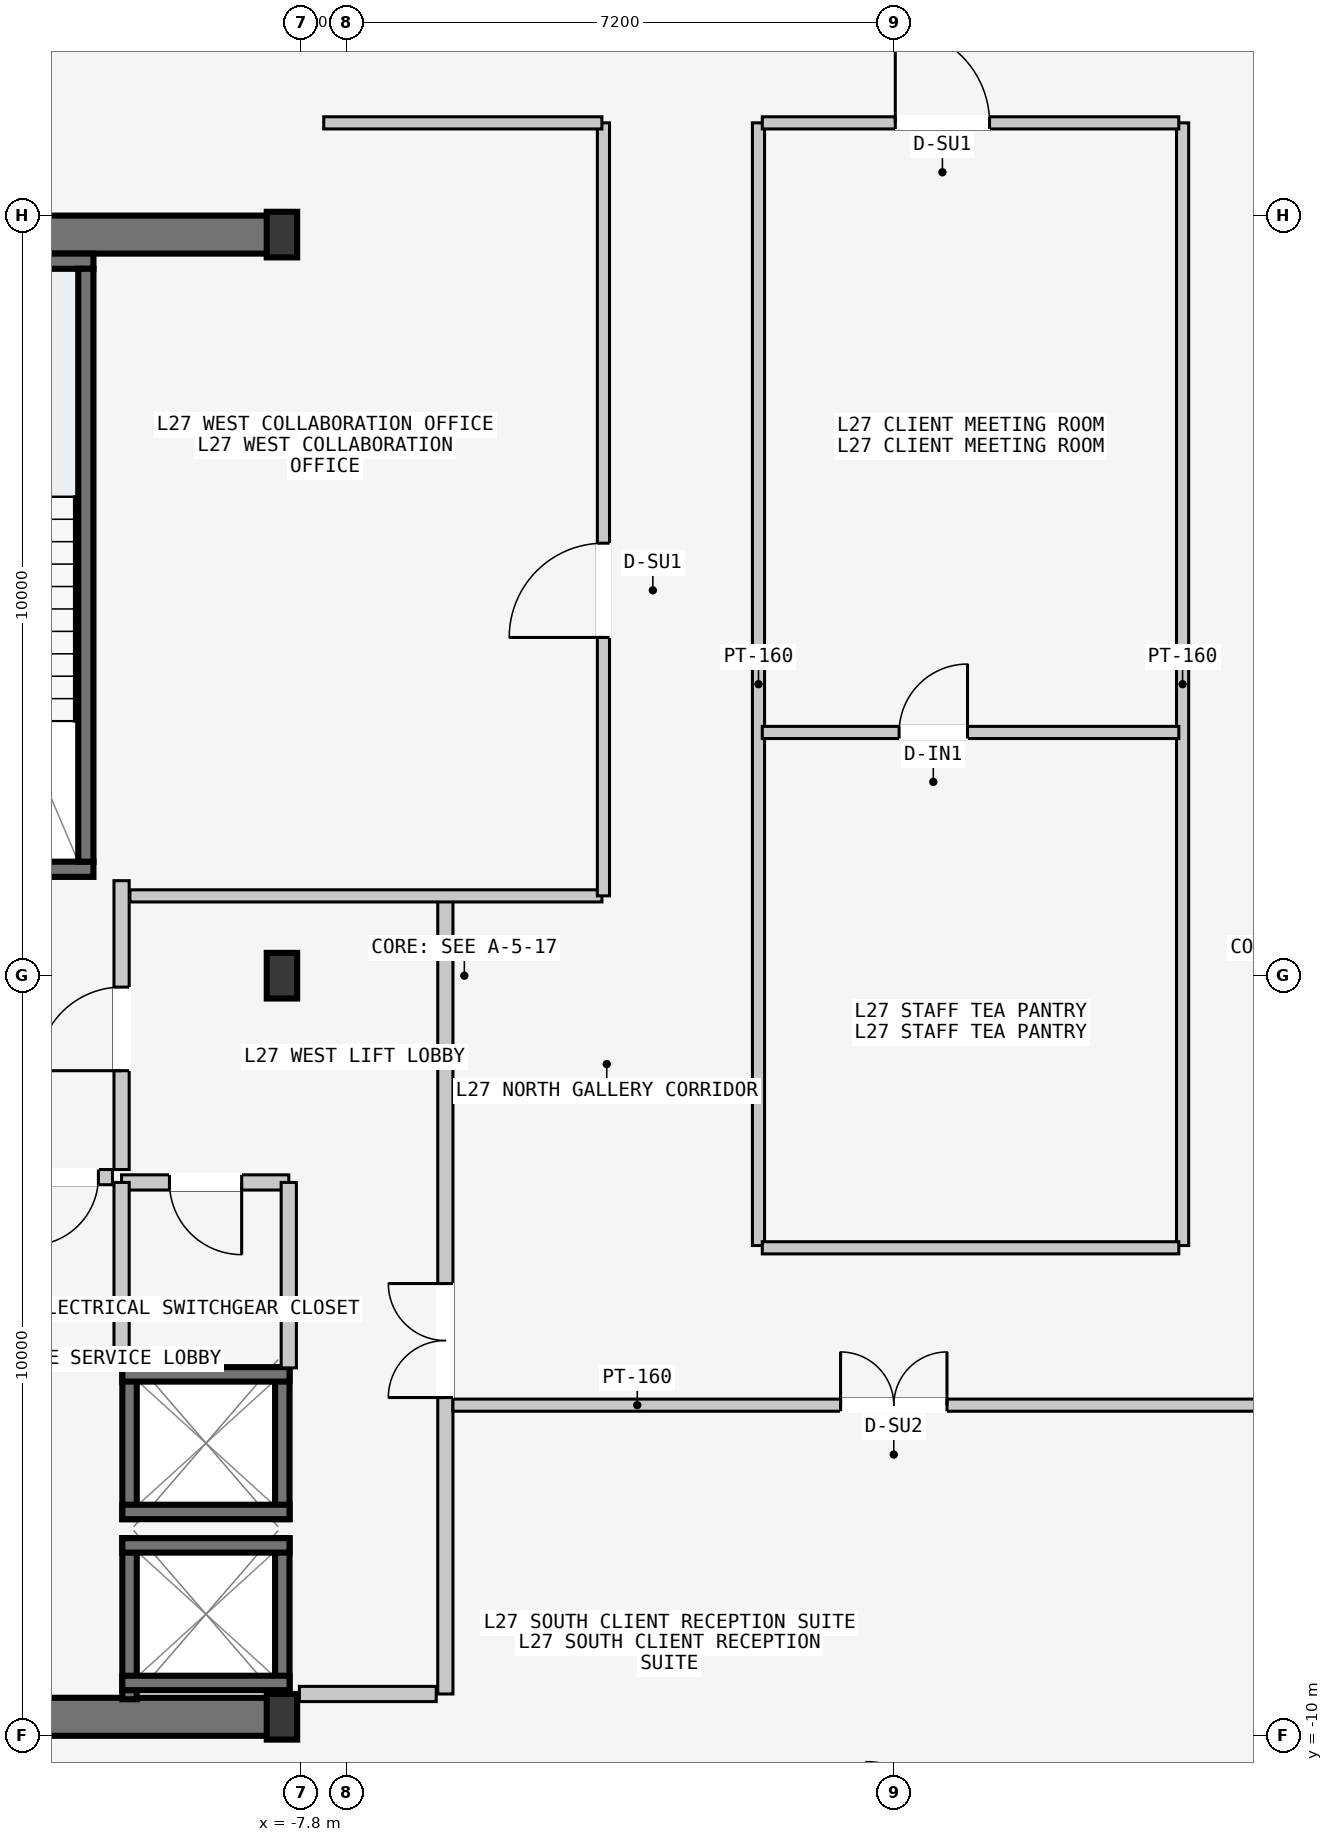
"""IFC4 building model, lengths in metres.
Left out: names, types, materials, properties, quantities, classifications, styles, units other than length and angle.
Written with IfcOpenShell. Run it as: python <this file> out.ifc"""

import sys

from ifc_helpers import new_model, si_unit, direction, frame, frame_2d, origin, origin_2d, place, context, subcontext, project, spatial, rectangle, i_section, extrude, element, fill, save


model = new_model("IFC4")
c1 = context("Model", 3, precision=1e-05, world=origin(), true_north=direction((0.0, 1.0)))
c2 = subcontext(c1, "Body", "Model", "MODEL_VIEW")
j1 = project(units=[si_unit("LENGTHUNIT", "METRE"), si_unit("PLANEANGLEUNIT", "RADIAN")], contexts=[c1])
p1 = place(None, origin())
s1 = spatial("IfcSite", under=j1, at=p1, CompositionType="ELEMENT")
p2 = place(p1, origin())
s2 = spatial("IfcBuilding", under=s1, at=p2, CompositionType="ELEMENT")
p3 = place(p2, frame((0.0, 0.0, 106.2)))
s3 = spatial("IfcBuildingStorey", under=s2, at=p3, CompositionType="ELEMENT", Elevation=106.2)
for number, where, z_axis, x_axis in (
    (1, (-14.53, -9.75, -0.2), (0.0, 0.0, 1.0), (1.0, 0.0, 0.0)),
    (2, (-14.53, 9.75, -0.2), (0.0, 0.0, 1.0), (1.0, 0.0, 0.0)),
):
    element("IfcWall", number, at=place(p3, frame(where, z_axis=z_axis, x_axis=x_axis)), inside=s3, PredefinedType="SHEAR", context=c2, shape_type="SweptSolid", body=[
        extrude(rectangle(XDim=6.46, YDim=0.5, at=frame_2d((3.23, 0.0))), origin(), (0.0, 0.0, 1.0), 3.6),
    ])
p4 = place(p3, frame((-14.25, 1.4, -0.2), z_axis=(0.0, 0.0, 1.0), x_axis=(1.0, 0.0, 0.0)))
e3 = element("IfcWall", 3, at=p4, inside=s3, PredefinedType="SOLIDWALL", context=c2, shape_type="SweptSolid", body=[
    extrude(rectangle(XDim=3.72, YDim=0.2, at=frame_2d((1.86, 0.0))), origin(), (0.0, 0.0, 1.0), 3.6),
])
p5 = place(p4, frame((1.5, 0.0, 0.2)))
e4 = element("IfcOpeningElement", 4, at=p5, cuts=e3, PredefinedType="OPENING", context=c2, shape_type="SweptSolid", body=[
    extrude(rectangle(XDim=1.12, YDim=2.18, at=frame_2d((0.56, 1.09))), frame((0.0, 0.11, 0.0), z_axis=(0.0, -1.0, 0.0), x_axis=(1.0, 0.0, 0.0)), (0.0, 0.0, 1.0), 0.22),
])
p6 = place(p3, frame((-14.25, 9.4, -0.2), z_axis=(0.0, 0.0, 1.0), x_axis=(1.0, 0.0, 0.0)))
e5 = element("IfcWall", 5, at=p6, inside=s3, PredefinedType="SOLIDWALL", context=c2, shape_type="SweptSolid", body=[
    extrude(rectangle(XDim=3.72, YDim=0.2, at=frame_2d((1.86, 0.0))), origin(), (0.0, 0.0, 1.0), 3.6),
])
p7 = place(p3, frame((-10.63, 1.5, -0.2), z_axis=(0.0, 0.0, 1.0), x_axis=(0.0, 1.0, 0.0)))
e6 = element("IfcWall", 6, at=p7, inside=s3, PredefinedType="SOLIDWALL", context=c2, shape_type="SweptSolid", body=[
    extrude(rectangle(XDim=7.8, YDim=0.2, at=frame_2d((3.9, 0.0))), origin(), (0.0, 0.0, 1.0), 3.6),
])
for number, where, z_axis, x_axis in (
    (7, (-8.05, -9.75, 0.0), (0.0, 0.0, 1.0), (1.0, 0.0, 0.0)),
    (8, (-8.05, 0.0, 0.0), (0.0, 0.0, 1.0), (1.0, 0.0, 0.0)),
    (9, (-8.05, 9.75, 0.0), (0.0, 0.0, 1.0), (1.0, 0.0, 0.0)),
):
    element("IfcColumn", number, at=place(p3, frame(where, z_axis=z_axis, x_axis=x_axis)), inside=s3, PredefinedType="COLUMN", context=c2, shape_type="SweptSolid", body=[
        extrude(i_section(OverallWidth=0.4, OverallDepth=0.6, WebThickness=0.022, FlangeThickness=0.036, at=origin_2d()), origin(), (0.0, 0.0, 1.0), 3.6),
    ])
for number, where, z_axis, x_axis in (
    (10, (-8.045, -9.52, -0.2), (0.0, 0.0, 1.0), (0.0, 1.0, 0.0)),
    (11, (-10.055, -9.52, -0.2), (0.0, 0.0, 1.0), (0.0, 1.0, 0.0)),
):
    element("IfcWall", number, at=place(p3, frame(where, z_axis=z_axis, x_axis=x_axis)), inside=s3, PredefinedType="SOLIDWALL", context=c2, shape_type="SweptSolid", body=[
        extrude(rectangle(XDim=2.12, YDim=0.19, at=frame_2d((1.06, 0.0))), origin(), (0.0, 0.0, 1.0), 3.6),
    ])
for number, where, z_axis, x_axis in (
    (12, (-10.15, -7.495, -0.2), (0.0, 0.0, 1.0), (1.0, 0.0, 0.0)),
    (13, (-10.15, -9.305, -0.2), (0.0, 0.0, 1.0), (1.0, 0.0, 0.0)),
):
    element("IfcWall", number, at=place(p3, frame(where, z_axis=z_axis, x_axis=x_axis)), inside=s3, PredefinedType="SOLIDWALL", context=c2, shape_type="SweptSolid", body=[
        extrude(rectangle(XDim=2.2, YDim=0.19, at=frame_2d((1.1, 0.0))), origin(), (0.0, 0.0, 1.0), 3.6),
    ])
for number, where, z_axis, x_axis in (
    (14, (-8.045, -7.15, -0.2), (0.0, 0.0, 1.0), (0.0, 1.0, 0.0)),
    (15, (-10.055, -7.15, -0.2), (0.0, 0.0, 1.0), (0.0, 1.0, 0.0)),
):
    element("IfcWall", number, at=place(p3, frame(where, z_axis=z_axis, x_axis=x_axis)), inside=s3, PredefinedType="SOLIDWALL", context=c2, shape_type="SweptSolid", body=[
        extrude(rectangle(XDim=2.0, YDim=0.19, at=frame_2d((1.0, 0.0))), origin(), (0.0, 0.0, 1.0), 3.6),
    ])
for number, where, z_axis, x_axis in (
    (16, (-10.15, -5.245, -0.2), (0.0, 0.0, 1.0), (1.0, 0.0, 0.0)),
    (17, (-10.15, -7.055, -0.2), (0.0, 0.0, 1.0), (1.0, 0.0, 0.0)),
):
    element("IfcWall", number, at=place(p3, frame(where, z_axis=z_axis, x_axis=x_axis)), inside=s3, PredefinedType="SOLIDWALL", context=c2, shape_type="SweptSolid", body=[
        extrude(rectangle(XDim=2.2, YDim=0.19, at=frame_2d((1.1, 0.0))), origin(), (0.0, 0.0, 1.0), 3.6),
    ])
p8 = place(p3, frame((-5.9, -9.45, 0.0), z_axis=(0.0, 0.0, 1.0), x_axis=(0.0, 1.0, 0.0)))
e18 = element("IfcWall", 18, at=p8, inside=s3, PredefinedType="PARTITIONING", context=c2, shape_type="SweptSolid", body=[
    extrude(rectangle(XDim=10.5, YDim=0.2, at=frame_2d((5.25, 0.0))), origin(), (0.0, 0.0, 1.0), 3.4),
])
p9 = place(p8, frame((3.9, 0.0, 0.0)))
e19 = element("IfcOpeningElement", 19, at=p9, cuts=e18, PredefinedType="OPENING", context=c2, shape_type="SweptSolid", body=[
    extrude(rectangle(XDim=1.5, YDim=2.2, at=frame_2d((0.75, 1.1))), frame((0.0, 0.11, 0.0), z_axis=(0.0, -1.0, 0.0), x_axis=(1.0, 0.0, 0.0)), (0.0, 0.0, 1.0), 0.22),
])
p10 = place(p3, frame((-6.02, -9.45, 0.0), z_axis=(0.0, 0.0, 1.0), x_axis=(-1.0, 0.0, 0.0)))
e20 = element("IfcWall", 20, at=p10, inside=s3, PredefinedType="PARTITIONING", context=c2, shape_type="SweptSolid", body=[
    extrude(rectangle(XDim=1.8, YDim=0.2, at=frame_2d((0.9, 0.0))), origin(), (0.0, 0.0, 1.0), 3.4),
])
p11 = place(p3, frame((-10.16, -2.55, 0.0), z_axis=(0.0, 0.0, 1.0), x_axis=(0.0, 1.0, 0.0)))
e21 = element("IfcWall", 21, at=p11, inside=s3, PredefinedType="PARTITIONING", context=c2, shape_type="SweptSolid", body=[
    extrude(rectangle(XDim=3.8, YDim=0.2, at=frame_2d((1.9, 0.0))), origin(), (0.0, 0.0, 1.0), 3.4),
])
p12 = place(p11, frame((1.3, 0.0, 0.0)))
e22 = element("IfcOpeningElement", 22, at=p12, cuts=e21, PredefinedType="OPENING", context=c2, shape_type="SweptSolid", body=[
    extrude(rectangle(XDim=1.1, YDim=2.15, at=frame_2d((0.55, 1.075))), frame((0.0, 0.11, 0.0), z_axis=(0.0, -1.0, 0.0), x_axis=(1.0, 0.0, 0.0)), (0.0, 0.0, 1.0), 0.22),
])
p13 = place(p3, frame((-10.28, -2.65, 0.0), z_axis=(0.0, 0.0, 1.0), x_axis=(-1.0, 0.0, 0.0)))
e23 = element("IfcWall", 23, at=p13, inside=s3, PredefinedType="PARTITIONING", context=c2, shape_type="SweptSolid", body=[
    extrude(rectangle(XDim=1.27, YDim=0.2, at=frame_2d((0.635, 0.0))), origin(), (0.0, 0.0, 1.0), 3.4),
])
p14 = place(p13, frame((0.185, 0.0, 0.0)))
e24 = element("IfcOpeningElement", 24, at=p14, cuts=e23, PredefinedType="OPENING", context=c2, shape_type="SweptSolid", body=[
    extrude(rectangle(XDim=0.9, YDim=2.15, at=frame_2d((0.45, 1.075))), frame((0.0, 0.11, 0.0), z_axis=(0.0, -1.0, 0.0), x_axis=(1.0, 0.0, 0.0)), (0.0, 0.0, 1.0), 0.22),
])
p15 = place(p3, frame((-7.96, -2.72, 0.0), z_axis=(0.0, 0.0, 1.0), x_axis=(-1.0, 0.0, 0.0)))
e25 = element("IfcWall", 25, at=p15, inside=s3, PredefinedType="PARTITIONING", context=c2, shape_type="SweptSolid", body=[
    extrude(rectangle(XDim=2.2, YDim=0.2, at=frame_2d((1.1, 0.0))), origin(), (0.0, 0.0, 1.0), 3.4),
])
p16 = place(p15, frame((0.62, 0.0, 0.0)))
e26 = element("IfcOpeningElement", 26, at=p16, cuts=e25, PredefinedType="OPENING", context=c2, shape_type="SweptSolid", body=[
    extrude(rectangle(XDim=0.95, YDim=2.1, at=frame_2d((0.475, 1.05))), frame((0.0, 0.11, 0.0), z_axis=(0.0, -1.0, 0.0), x_axis=(1.0, 0.0, 0.0)), (0.0, 0.0, 1.0), 0.22),
])
for number, where, z_axis, x_axis in (
    (27, (-7.96, -5.16, 0.0), (0.0, 0.0, 1.0), (0.0, 1.0, 0.0)),
    (28, (-10.16, -5.16, 0.0), (0.0, 0.0, 1.0), (0.0, 1.0, 0.0)),
):
    element("IfcWall", number, at=place(p3, frame(where, z_axis=z_axis, x_axis=x_axis)), inside=s3, PredefinedType="PARTITIONING", context=c2, shape_type="SweptSolid", body=[
        extrude(rectangle(XDim=2.44, YDim=0.2, at=frame_2d((1.22, 0.0))), origin(), (0.0, 0.0, 1.0), 3.4),
    ])
p17 = place(p3, frame((-10.05, 1.05, 0.0), z_axis=(0.0, 0.0, 1.0), x_axis=(1.0, 0.0, 0.0)))
e29 = element("IfcWall", 29, at=p17, inside=s3, PredefinedType="PARTITIONING", context=c2, shape_type="SweptSolid", body=[
    extrude(rectangle(XDim=6.21, YDim=0.16, at=frame_2d((3.105, 0.0))), origin(), (0.0, 0.0, 1.0), 3.4),
])
p18 = place(p3, frame((-3.82, 1.05, 0.0), z_axis=(0.0, 0.0, 1.0), x_axis=(0.0, 1.0, 0.0)))
e30 = element("IfcWall", 30, at=p18, inside=s3, PredefinedType="PARTITIONING", context=c2, shape_type="SweptSolid", body=[
    extrude(rectangle(XDim=10.17, YDim=0.16, at=frame_2d((5.085, 0.0))), origin(), (0.0, 0.0, 1.0), 3.4),
])
p19 = place(p18, frame((3.4, 0.0, 0.0)))
e31 = element("IfcOpeningElement", 31, at=p19, cuts=e30, PredefinedType="OPENING", context=c2, shape_type="SweptSolid", body=[
    extrude(rectangle(XDim=1.24, YDim=2.24, at=frame_2d((0.62, 1.12))), frame((0.0, 0.09, 0.0), z_axis=(0.0, -1.0, 0.0), x_axis=(1.0, 0.0, 0.0)), (0.0, 0.0, 1.0), 0.18),
])
p20 = place(p3, frame((-7.5, 11.22, 0.0), z_axis=(0.0, 0.0, 1.0), x_axis=(1.0, 0.0, 0.0)))
e32 = element("IfcWall", 32, at=p20, inside=s3, PredefinedType="PARTITIONING", context=c2, shape_type="SweptSolid", body=[
    extrude(rectangle(XDim=3.66, YDim=0.16, at=frame_2d((1.83, 0.0))), origin(), (0.0, 0.0, 1.0), 3.4),
])
for number, where, z_axis, x_axis in (
    (33, (-1.78, -3.55, 0.0), (0.0, 0.0, 1.0), (0.0, 1.0, 0.0)),
    (34, (3.8, -3.55, 0.0), (0.0, 0.0, 1.0), (0.0, 1.0, 0.0)),
):
    element("IfcWall", number, at=place(p3, frame(where, z_axis=z_axis, x_axis=x_axis)), inside=s3, PredefinedType="PARTITIONING", context=c2, shape_type="SweptSolid", body=[
        extrude(rectangle(XDim=14.77, YDim=0.16, at=frame_2d((7.385, 0.0))), origin(), (0.0, 0.0, 1.0), 3.4),
    ])
p21 = place(p3, frame((-1.73, -3.58, 0.0), z_axis=(0.0, 0.0, 1.0), x_axis=(1.0, 0.0, 0.0)))
e35 = element("IfcWall", 35, at=p21, inside=s3, PredefinedType="PARTITIONING", context=c2, shape_type="SweptSolid", body=[
    extrude(rectangle(XDim=5.48, YDim=0.16, at=frame_2d((2.74, 0.0))), origin(), (0.0, 0.0, 1.0), 3.4),
])
p22 = place(p3, frame((-1.73, 3.2, 0.0), z_axis=(0.0, 0.0, 1.0), x_axis=(1.0, 0.0, 0.0)))
e36 = element("IfcWall", 36, at=p22, inside=s3, PredefinedType="PARTITIONING", context=c2, shape_type="SweptSolid", body=[
    extrude(rectangle(XDim=5.48, YDim=0.16, at=frame_2d((2.74, 0.0))), origin(), (0.0, 0.0, 1.0), 3.4),
])
p23 = place(p22, frame((1.8, 0.0, 0.0)))
e37 = element("IfcOpeningElement", 37, at=p23, cuts=e36, PredefinedType="OPENING", context=c2, shape_type="SweptSolid", body=[
    extrude(rectangle(XDim=0.9, YDim=2.15, at=frame_2d((0.45, 1.075))), frame((0.0, 0.09, 0.0), z_axis=(0.0, -1.0, 0.0), x_axis=(1.0, 0.0, 0.0)), (0.0, 0.0, 1.0), 0.18),
])
p24 = place(p3, frame((-1.73, 11.22, 0.0), z_axis=(0.0, 0.0, 1.0), x_axis=(1.0, 0.0, 0.0)))
e38 = element("IfcWall", 38, at=p24, inside=s3, PredefinedType="PARTITIONING", context=c2, shape_type="SweptSolid", body=[
    extrude(rectangle(XDim=5.48, YDim=0.16, at=frame_2d((2.74, 0.0))), origin(), (0.0, 0.0, 1.0), 3.4),
])
p25 = place(p24, frame((1.75, 0.0, 0.0)))
e39 = element("IfcOpeningElement", 39, at=p25, cuts=e38, PredefinedType="OPENING", context=c2, shape_type="SweptSolid", body=[
    extrude(rectangle(XDim=1.24, YDim=2.24, at=frame_2d((0.62, 1.12))), frame((0.0, 0.09, 0.0), z_axis=(0.0, -1.0, 0.0), x_axis=(1.0, 0.0, 0.0)), (0.0, 0.0, 1.0), 0.18),
])
p26 = place(p3, frame((-5.8, -5.65, 0.0), z_axis=(0.0, 0.0, 1.0), x_axis=(1.0, 0.0, 0.0)))
e40 = element("IfcWall", 40, at=p26, inside=s3, PredefinedType="PARTITIONING", context=c2, shape_type="SweptSolid", body=[
    extrude(rectangle(XDim=11.6, YDim=0.16, at=frame_2d((5.8, 0.0))), origin(), (0.0, 0.0, 1.0), 3.4),
])
p27 = place(p26, frame((5.1, 0.0, 0.0)))
e41 = element("IfcOpeningElement", 41, at=p27, cuts=e40, PredefinedType="OPENING", context=c2, shape_type="SweptSolid", body=[
    extrude(rectangle(XDim=1.4, YDim=2.2, at=frame_2d((0.7, 1.1))), frame((0.0, 0.09, 0.0), z_axis=(0.0, -1.0, 0.0), x_axis=(1.0, 0.0, 0.0)), (0.0, 0.0, 1.0), 0.18),
])
p28 = place(p9, origin())
e42 = element("IfcDoor", 42, at=p28, inside=s3, OperationType="DOUBLE_DOOR_SINGLE_SWING", PredefinedType="DOOR", context=c2, shape_type="SweptSolid", body=[
    extrude(rectangle(XDim=1.5, YDim=2.2, at=frame_2d((0.75, 1.1))), frame((0.0, 0.025, 0.0), z_axis=(0.0, -1.0, 0.0), x_axis=(1.0, 0.0, 0.0)), (0.0, 0.0, 1.0), 0.05),
])
fill(e19, e42)
p29 = place(p12, origin())
e43 = element("IfcDoor", 43, at=p29, inside=s3, OperationType="SINGLE_SWING_LEFT", PredefinedType="DOOR", context=c2, shape_type="SweptSolid", body=[
    extrude(rectangle(XDim=1.1, YDim=2.15, at=frame_2d((0.55, 1.075))), frame((0.0, 0.025, 0.0), z_axis=(0.0, -1.0, 0.0), x_axis=(1.0, 0.0, 0.0)), (0.0, 0.0, 1.0), 0.05),
])
fill(e22, e43)
p30 = place(p14, origin())
e44 = element("IfcDoor", 44, at=p30, inside=s3, OperationType="SINGLE_SWING_RIGHT", PredefinedType="DOOR", context=c2, shape_type="SweptSolid", body=[
    extrude(rectangle(XDim=0.9, YDim=2.15, at=frame_2d((0.45, 1.075))), frame((0.0, 0.025, 0.0), z_axis=(0.0, -1.0, 0.0), x_axis=(1.0, 0.0, 0.0)), (0.0, 0.0, 1.0), 0.05),
])
fill(e24, e44)
p31 = place(p16, origin())
e45 = element("IfcDoor", 45, at=p31, inside=s3, OperationType="SINGLE_SWING_LEFT", PredefinedType="DOOR", context=c2, shape_type="SweptSolid", body=[
    extrude(rectangle(XDim=0.95, YDim=2.1, at=frame_2d((0.475, 1.05))), frame((0.0, 0.025, 0.0), z_axis=(0.0, -1.0, 0.0), x_axis=(1.0, 0.0, 0.0)), (0.0, 0.0, 1.0), 0.05),
])
fill(e26, e45)
p32 = place(p19, origin())
e46 = element("IfcDoor", 46, at=p32, inside=s3, OperationType="SINGLE_SWING_LEFT", PredefinedType="DOOR", context=c2, shape_type="SweptSolid", body=[
    extrude(rectangle(XDim=1.24, YDim=2.24, at=frame_2d((0.62, 1.12))), frame((0.0, 0.025, 0.0), z_axis=(0.0, -1.0, 0.0), x_axis=(1.0, 0.0, 0.0)), (0.0, 0.0, 1.0), 0.05),
])
fill(e31, e46)
p33 = place(p23, origin())
e47 = element("IfcDoor", 47, at=p33, inside=s3, OperationType="SINGLE_SWING_RIGHT", PredefinedType="DOOR", context=c2, shape_type="SweptSolid", body=[
    extrude(rectangle(XDim=0.9, YDim=2.15, at=frame_2d((0.45, 1.075))), frame((0.0, 0.025, 0.0), z_axis=(0.0, -1.0, 0.0), x_axis=(1.0, 0.0, 0.0)), (0.0, 0.0, 1.0), 0.05),
])
fill(e37, e47)
p34 = place(p25, origin())
e48 = element("IfcDoor", 48, at=p34, inside=s3, OperationType="SINGLE_SWING_LEFT", PredefinedType="DOOR", context=c2, shape_type="SweptSolid", body=[
    extrude(rectangle(XDim=1.24, YDim=2.24, at=frame_2d((0.62, 1.12))), frame((0.0, 0.025, 0.0), z_axis=(0.0, -1.0, 0.0), x_axis=(1.0, 0.0, 0.0)), (0.0, 0.0, 1.0), 0.05),
])
fill(e39, e48)
p35 = place(p27, origin())
e49 = element("IfcDoor", 49, at=p35, inside=s3, OperationType="DOUBLE_DOOR_SINGLE_SWING", PredefinedType="DOOR", context=c2, shape_type="SweptSolid", body=[
    extrude(rectangle(XDim=1.4, YDim=2.2, at=frame_2d((0.7, 1.1))), frame((0.0, 0.025, 0.0), z_axis=(0.0, -1.0, 0.0), x_axis=(1.0, 0.0, 0.0)), (0.0, 0.0, 1.0), 0.05),
])
fill(e41, e49)
save(model, sys.argv[1])
